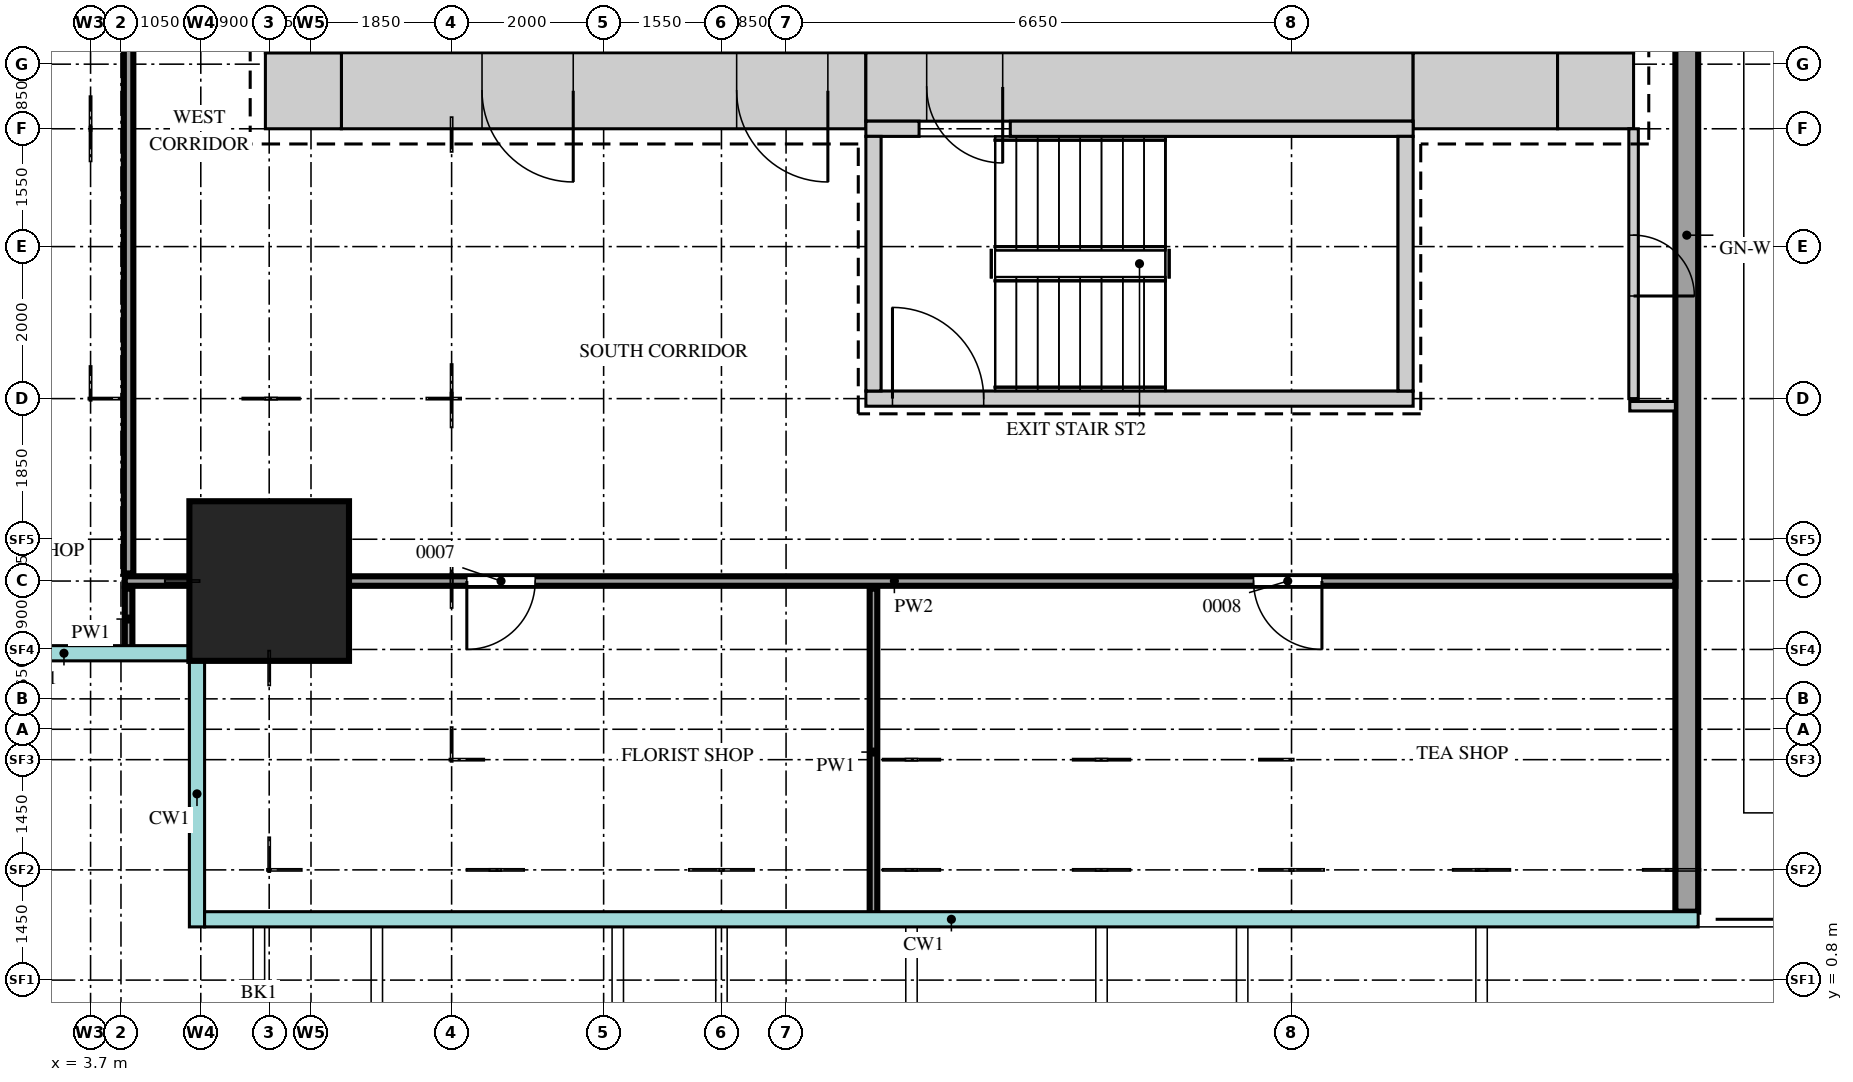
"""IFC4 building model, lengths in metres.
Left out: names, types, materials, properties, quantities, classifications, styles, units other than length and angle.
Written with IfcOpenShell. Run it as: python <this file> out.ifc"""

import sys

from ifc_helpers import new_model, si_unit, direction, frame, frame_2d, origin, origin_2d, place, context, subcontext, project, spatial, rectangle, extrude, source, transform, mapped, element, fill, save


model = new_model("IFC4")
c1 = context("Model", 3, precision=1e-05, world=origin(), true_north=direction((0.0, 1.0)))
c2 = subcontext(c1, "Body", "Model", "MODEL_VIEW")
j1 = project(units=[si_unit("LENGTHUNIT", "METRE"), si_unit("PLANEANGLEUNIT", "RADIAN")], contexts=[c1])
p1 = place(None, origin())
s1 = spatial("IfcSite", under=j1, at=p1, CompositionType="ELEMENT")
p2 = place(p1, origin())
s2 = spatial("IfcBuilding", under=s1, at=p2, CompositionType="ELEMENT")
p3 = place(p2, frame((0.0, 0.0, 158.7)))
s3 = spatial("IfcBuildingStorey", under=s2, at=p3, CompositionType="ELEMENT", Elevation=158.7)
m1 = source(origin(), c2, "Body", "SweptSolid", [
    extrude(rectangle(XDim=6.9, YDim=1.0, at=frame_2d((3.45, 0.0))), origin(), (0.0, 0.0, 1.0), 5.75),
])
p4 = place(p3, frame((7.0, 12.5, 0.0), z_axis=(0.0, 0.0, 1.0), x_axis=(1.0, 0.0, 0.0)))
e1 = element("IfcWall", 1, at=p4, inside=s3, PredefinedType="SHEAR", context=c2, shape_type="MappedRepresentation", body=[
    mapped(m1, transform((0.0, 0.0, 0.0))),
])
m2 = source(origin(), c2, "Body", "SweptSolid", [
    extrude(rectangle(XDim=1.2, YDim=2.1, at=frame_2d((0.6, 1.05))), frame((0.0, 0.51, 0.0), z_axis=(0.0, -1.0, 0.0), x_axis=(1.0, 0.0, 0.0)), (0.0, 0.0, 1.0), 1.02),
])
p5 = place(p4, frame((5.2, 0.0, 0.0)))
e2 = element("IfcOpeningElement", 2, at=p5, cuts=e1, PredefinedType="OPENING", context=c2, shape_type="MappedRepresentation", body=[
    mapped(m2, transform((0.0, 0.0, 0.0))),
])
p6 = place(p4, frame((1.85, 0.0, 0.0)))
e3 = element("IfcOpeningElement", 3, at=p6, cuts=e1, PredefinedType="OPENING", context=c2, shape_type="MappedRepresentation", body=[
    mapped(m2, transform((0.0, 0.0, 0.0))),
])
m3 = source(origin(), c2, "Body", "SweptSolid", [
    extrude(rectangle(XDim=7.2, YDim=0.9, at=frame_2d((3.6, 0.0))), origin(), (0.0, 0.0, 1.0), 5.75),
])
p7 = place(p3, frame((13.9, 12.55, 0.0), z_axis=(0.0, 0.0, 1.0), x_axis=(1.0, 0.0, 0.0)))
e4 = element("IfcWall", 4, at=p7, inside=s3, PredefinedType="SHEAR", context=c2, shape_type="MappedRepresentation", body=[
    mapped(m3, transform((0.0, 0.0, 0.0))),
])
m4 = source(origin(), c2, "Body", "SweptSolid", [
    extrude(rectangle(XDim=1.0, YDim=2.1, at=frame_2d((0.5, 1.05))), frame((0.0, 0.46, 0.0), z_axis=(0.0, -1.0, 0.0), x_axis=(1.0, 0.0, 0.0)), (0.0, 0.0, 1.0), 0.92),
])
p8 = place(p7, frame((0.8, 0.0, 0.0)))
e5 = element("IfcOpeningElement", 5, at=p8, cuts=e4, PredefinedType="OPENING", context=c2, shape_type="MappedRepresentation", body=[
    mapped(m4, transform((0.0, 0.0, 0.0))),
])
m5 = source(origin(), c2, "Body", "SweptSolid", [
    extrude(rectangle(XDim=1.9, YDim=1.0, at=frame_2d((0.95, 0.0))), origin(), (0.0, 0.0, 1.0), 5.75),
])
p9 = place(p3, frame((21.1, 12.5, 0.0), z_axis=(0.0, 0.0, 1.0), x_axis=(1.0, 0.0, 0.0)))
e6 = element("IfcWall", 6, at=p9, inside=s3, PredefinedType="SHEAR", context=c2, shape_type="MappedRepresentation", body=[
    mapped(m5, transform((0.0, 0.0, 0.0))),
])
m6 = source(origin(), c2, "Body", "SweptSolid", [
    extrude(rectangle(XDim=1.0, YDim=1.0, at=frame_2d((0.5, 0.0))), origin(), (0.0, 0.0, 1.0), 5.75),
])
for number, where, z_axis, x_axis in (
    (7, (23.0, 12.5, 0.0), (0.0, 0.0, 1.0), (1.0, 0.0, 0.0)),
    (8, (6.0, 12.5, 0.0), (0.0, 0.0, 1.0), (1.0, 0.0, 0.0)),
):
    element("IfcWall", number, at=place(p3, frame(where, z_axis=z_axis, x_axis=x_axis)), inside=s3, PredefinedType="SHEAR", context=c2, shape_type="MappedRepresentation", body=[
        mapped(m6, transform((0.0, 0.0, 0.0))),
    ])
m7 = source(origin(), c2, "Body", "SweptSolid", [
    extrude(rectangle(XDim=0.7, YDim=0.2, at=frame_2d((0.35, 0.0))), origin(), (0.0, 0.0, 1.0), 5.75),
])
p10 = place(p3, frame((13.9, 12.0, 0.0), z_axis=(0.0, 0.0, 1.0), x_axis=(1.0, 0.0, 0.0)))
e9 = element("IfcWall", 9, at=p10, inside=s3, PredefinedType="SHEAR", context=c2, shape_type="MappedRepresentation", body=[
    mapped(m7, transform((0.0, 0.0, 0.0))),
])
m8 = source(origin(), c2, "Body", "SweptSolid", [
    extrude(rectangle(XDim=5.3, YDim=0.2, at=frame_2d((2.65, 0.0))), origin(), (0.0, 0.0, 1.0), 5.75),
])
p11 = place(p3, frame((15.8, 12.0, 0.0), z_axis=(0.0, 0.0, 1.0), x_axis=(1.0, 0.0, 0.0)))
e10 = element("IfcWall", 10, at=p11, inside=s3, PredefinedType="SHEAR", context=c2, shape_type="MappedRepresentation", body=[
    mapped(m8, transform((0.0, 0.0, 0.0))),
])
m9 = source(origin(), c2, "Body", "SweptSolid", [
    extrude(rectangle(XDim=7.2, YDim=0.2, at=frame_2d((3.6, 0.0))), origin(), (0.0, 0.0, 1.0), 5.75),
])
p12 = place(p3, frame((13.9, 8.45, 0.0), z_axis=(0.0, 0.0, 1.0), x_axis=(1.0, 0.0, 0.0)))
e11 = element("IfcWall", 11, at=p12, inside=s3, PredefinedType="SHEAR", context=c2, shape_type="MappedRepresentation", body=[
    mapped(m9, transform((0.0, 0.0, 0.0))),
])
m10 = source(origin(), c2, "Body", "SweptSolid", [
    extrude(rectangle(XDim=1.2, YDim=2.1, at=frame_2d((0.6, 1.05))), frame((0.0, 0.11, 0.0), z_axis=(0.0, -1.0, 0.0), x_axis=(1.0, 0.0, 0.0)), (0.0, 0.0, 1.0), 0.22),
])
p13 = place(p12, frame((0.35, 0.0, 0.0)))
e12 = element("IfcOpeningElement", 12, at=p13, cuts=e11, PredefinedType="OPENING", context=c2, shape_type="MappedRepresentation", body=[
    mapped(m10, transform((0.0, 0.0, 0.0))),
])
m11 = source(origin(), c2, "Body", "SweptSolid", [
    extrude(rectangle(XDim=3.35, YDim=0.2, at=frame_2d((1.675, 0.0))), origin(), (0.0, 0.0, 1.0), 5.75),
])
for number, where, z_axis, x_axis in (
    (13, (21.0, 8.55, 0.0), (0.0, 0.0, 1.0), (0.0, 1.0, 0.0)),
    (14, (14.0, 8.55, 0.0), (0.0, 0.0, 1.0), (0.0, 1.0, 0.0)),
):
    element("IfcWall", number, at=place(p3, frame(where, z_axis=z_axis, x_axis=x_axis)), inside=s3, PredefinedType="SHEAR", context=c2, shape_type="MappedRepresentation", body=[
        mapped(m11, transform((0.0, 0.0, 0.0))),
    ])
m12 = source(origin(), c2, "Body", "SweptSolid", [
    extrude(rectangle(XDim=2.1, YDim=2.1, at=origin_2d()), origin(), (0.0, 0.0, 1.0), 6.0),
])
p14 = place(p3, frame((6.05, 6.05, 0.0), z_axis=(0.0, 0.0, 1.0), x_axis=(1.0, 0.0, 0.0)))
e15 = element("IfcColumn", 15, at=p14, inside=s3, PredefinedType="COLUMN", context=c2, shape_type="MappedRepresentation", body=[
    mapped(m12, transform((0.0, 0.0, 0.0))),
])
m13 = source(origin(), c2, "Body", "SweptSolid", [
    extrude(rectangle(XDim=17.8, YDim=0.3, at=frame_2d((8.9, 0.0))), origin(), (0.0, 0.0, 1.0), 5.55),
])
p15 = place(p3, frame((24.7, 1.7, 0.0), z_axis=(0.0, 0.0, 1.0), x_axis=(0.0, 1.0, 0.0)))
e16 = element("IfcWall", 16, at=p15, inside=s3, PredefinedType="SOLIDWALL", context=c2, shape_type="MappedRepresentation", body=[
    mapped(m13, transform((0.0, 0.0, 0.0))),
])
m14 = source(origin(), c2, "Body", "SweptSolid", [
    extrude(rectangle(XDim=4.3, YDim=0.1, at=frame_2d((2.15, 0.0))), origin(), (0.0, 0.0, 1.0), 5.75),
])
p16 = place(p3, frame((14.0, 1.65, 0.0), z_axis=(0.0, 0.0, 1.0), x_axis=(0.0, 1.0, 0.0)))
e17 = element("IfcWall", 17, at=p16, inside=s3, PredefinedType="PARTITIONING", context=c2, shape_type="MappedRepresentation", body=[
    mapped(m14, transform((0.0, 0.0, 0.0))),
])
m15 = source(origin(), c2, "Body", "SweptSolid", [
    extrude(rectangle(XDim=0.8, YDim=0.1, at=frame_2d((0.4, 0.0))), origin(), (0.0, 0.0, 1.0), 5.75),
])
p17 = place(p3, frame((4.2, 5.15, 0.0), z_axis=(0.0, 0.0, 1.0), x_axis=(0.0, 1.0, 0.0)))
e18 = element("IfcWall", 18, at=p17, inside=s3, PredefinedType="PARTITIONING", context=c2, shape_type="MappedRepresentation", body=[
    mapped(m15, transform((0.0, 0.0, 0.0))),
])
m16 = source(origin(), c2, "Body", "SweptSolid", [
    extrude(rectangle(XDim=20.4, YDim=0.125, at=frame_2d((10.2, 0.0))), origin(), (0.0, 0.0, 1.0), 5.75),
])
p18 = place(p3, frame((4.15, 6.05, 0.0), z_axis=(0.0, 0.0, 1.0), x_axis=(1.0, 0.0, 0.0)))
e19 = element("IfcWall", 19, at=p18, inside=s3, PredefinedType="PARTITIONING", context=c2, shape_type="MappedRepresentation", body=[
    mapped(m16, transform((0.0, 0.0, 0.0))),
])
m17 = source(origin(), c2, "Body", "SweptSolid", [
    extrude(rectangle(XDim=0.9, YDim=2.1, at=frame_2d((0.45, 1.05))), frame((0.0, 0.073, 0.0), z_axis=(0.0, -1.0, 0.0), x_axis=(1.0, 0.0, 0.0)), (0.0, 0.0, 1.0), 0.145),
])
p19 = place(p18, frame((4.5, 0.0, 0.0)))
e20 = element("IfcOpeningElement", 20, at=p19, cuts=e19, PredefinedType="OPENING", context=c2, shape_type="MappedRepresentation", body=[
    mapped(m17, transform((0.0, 0.0, 0.0))),
])
p20 = place(p18, frame((14.85, 0.0, 0.0)))
e21 = element("IfcOpeningElement", 21, at=p20, cuts=e19, PredefinedType="OPENING", context=c2, shape_type="MappedRepresentation", body=[
    mapped(m17, transform((0.0, 0.0, 0.0))),
])
m18 = source(origin(), c2, "Body", "SweptSolid", [
    extrude(rectangle(XDim=41.8, YDim=0.125, at=frame_2d((20.9, 0.0))), origin(), (0.0, 0.0, 1.0), 5.75),
])
p21 = place(p3, frame((4.2, 6.15, 0.0), z_axis=(0.0, 0.0, 1.0), x_axis=(0.0, 1.0, 0.0)))
e22 = element("IfcWall", 22, at=p21, inside=s3, PredefinedType="PARTITIONING", context=c2, shape_type="MappedRepresentation", body=[
    mapped(m18, transform((0.0, 0.0, 0.0))),
])
p22 = place(p21, frame((10.95, 0.0, 0.0)))
e23 = element("IfcOpeningElement", 23, at=p22, cuts=e22, PredefinedType="OPENING", context=c2, shape_type="MappedRepresentation", body=[
    mapped(m17, transform((0.0, 0.0, 0.0))),
])
p23 = place(p21, frame((29.55, 0.0, 0.0)))
e24 = element("IfcOpeningElement", 24, at=p23, cuts=e22, PredefinedType="OPENING", context=c2, shape_type="MappedRepresentation", body=[
    mapped(m17, transform((0.0, 0.0, 0.0))),
])
m19 = source(origin(), c2, "Body", "SweptSolid", [
    extrude(rectangle(XDim=0.6, YDim=0.125, at=frame_2d((0.3, 0.0))), origin(), (0.0, 0.0, 1.0), 5.75),
])
p24 = place(p3, frame((23.95, 8.35, 0.0), z_axis=(0.0, 0.0, 1.0), x_axis=(1.0, 0.0, 0.0)))
e25 = element("IfcWall", 25, at=p24, inside=s3, PredefinedType="PARTITIONING", context=c2, shape_type="MappedRepresentation", body=[
    mapped(m19, transform((0.0, 0.0, 0.0))),
])
m20 = source(origin(), c2, "Body", "SweptSolid", [
    extrude(rectangle(XDim=3.55, YDim=0.125, at=frame_2d((1.775, 0.0))), origin(), (0.0, 0.0, 1.0), 5.75),
])
p25 = place(p3, frame((24.0, 8.45, 0.0), z_axis=(0.0, 0.0, 1.0), x_axis=(0.0, 1.0, 0.0)))
e26 = element("IfcWall", 26, at=p25, inside=s3, PredefinedType="PARTITIONING", context=c2, shape_type="MappedRepresentation", body=[
    mapped(m20, transform((0.0, 0.0, 0.0))),
])
m21 = source(origin(), c2, "Body", "SweptSolid", [
    extrude(rectangle(XDim=0.8, YDim=2.1, at=frame_2d((0.4, 1.05))), frame((0.0, 0.073, 0.0), z_axis=(0.0, -1.0, 0.0), x_axis=(1.0, 0.0, 0.0)), (0.0, 0.0, 1.0), 0.145),
])
p26 = place(p25, frame((1.35, 0.0, 0.0)))
e27 = element("IfcOpeningElement", 27, at=p26, cuts=e26, PredefinedType="OPENING", context=c2, shape_type="MappedRepresentation", body=[
    mapped(m21, transform((0.0, 0.0, 0.0))),
])
m22 = source(origin(), c2, "Body", "SweptSolid", [
    extrude(rectangle(XDim=0.8, YDim=2.1, at=frame_2d((0.4, 1.05))), frame((0.0, 0.025, 0.0), z_axis=(0.0, -1.0, 0.0), x_axis=(1.0, 0.0, 0.0)), (0.0, 0.0, 1.0), 0.05),
])
p27 = place(p26, origin())
e28 = element("IfcDoor", 28, at=p27, inside=s3, OperationType="SINGLE_SWING_LEFT", PredefinedType="DOOR", context=c2, shape_type="MappedRepresentation", body=[
    mapped(m22, transform((0.0, 0.0, 0.0))),
])
fill(e27, e28)
m23 = source(origin(), c2, "Body", "SweptSolid", [
    extrude(rectangle(XDim=1.2, YDim=2.1, at=frame_2d((0.6, 1.05))), frame((0.0, 0.45, 0.0), z_axis=(0.0, -1.0, 0.0), x_axis=(1.0, 0.0, 0.0)), (0.0, 0.0, 1.0), 0.9),
])
p28 = place(p5, origin())
e29 = element("IfcDoor", 29, at=p28, inside=s3, OperationType="SINGLE_SWING_RIGHT", PredefinedType="DOOR", context=c2, shape_type="MappedRepresentation", body=[
    mapped(m23, transform((0.0, 0.0, 0.0))),
])
fill(e2, e29)
p29 = place(p6, origin())
e30 = element("IfcDoor", 30, at=p29, inside=s3, OperationType="SINGLE_SWING_RIGHT", PredefinedType="DOOR", context=c2, shape_type="MappedRepresentation", body=[
    mapped(m23, transform((0.0, 0.0, 0.0))),
])
fill(e3, e30)
m24 = source(origin(), c2, "Body", "SweptSolid", [
    extrude(rectangle(XDim=1.0, YDim=2.1, at=frame_2d((0.5, 1.05))), frame((0.0, 0.4, 0.0), z_axis=(0.0, -1.0, 0.0), x_axis=(1.0, 0.0, 0.0)), (0.0, 0.0, 1.0), 0.8),
])
p30 = place(p8, origin())
e31 = element("IfcDoor", 31, at=p30, inside=s3, OperationType="SINGLE_SWING_RIGHT", PredefinedType="DOOR", context=c2, shape_type="MappedRepresentation", body=[
    mapped(m24, transform((0.0, 0.0, 0.0))),
])
fill(e5, e31)
m25 = source(origin(), c2, "Body", "SweptSolid", [
    extrude(rectangle(XDim=0.9, YDim=2.1, at=frame_2d((0.45, 1.05))), frame((0.0, 0.025, 0.0), z_axis=(0.0, -1.0, 0.0), x_axis=(1.0, 0.0, 0.0)), (0.0, 0.0, 1.0), 0.05),
])
p31 = place(p19, origin())
e32 = element("IfcDoor", 32, at=p31, inside=s3, OperationType="SINGLE_SWING_LEFT", PredefinedType="DOOR", context=c2, shape_type="MappedRepresentation", body=[
    mapped(m25, transform((0.0, 0.0, 0.0))),
])
fill(e20, e32)
p32 = place(p20, origin())
e33 = element("IfcDoor", 33, at=p32, inside=s3, OperationType="SINGLE_SWING_RIGHT", PredefinedType="DOOR", context=c2, shape_type="MappedRepresentation", body=[
    mapped(m25, transform((0.0, 0.0, 0.0))),
])
fill(e21, e33)
m26 = source(origin(), c2, "Body", "SweptSolid", [
    extrude(rectangle(XDim=1.2, YDim=2.1, at=frame_2d((0.6, 1.05))), frame((0.0, 0.025, 0.0), z_axis=(0.0, -1.0, 0.0), x_axis=(1.0, 0.0, 0.0)), (0.0, 0.0, 1.0), 0.05),
])
p33 = place(p13, origin())
e34 = element("IfcDoor", 34, at=p33, inside=s3, OperationType="SINGLE_SWING_RIGHT", PredefinedType="DOOR", context=c2, shape_type="MappedRepresentation", body=[
    mapped(m26, transform((0.0, 0.0, 0.0))),
])
fill(e12, e34)
save(model, sys.argv[1])
